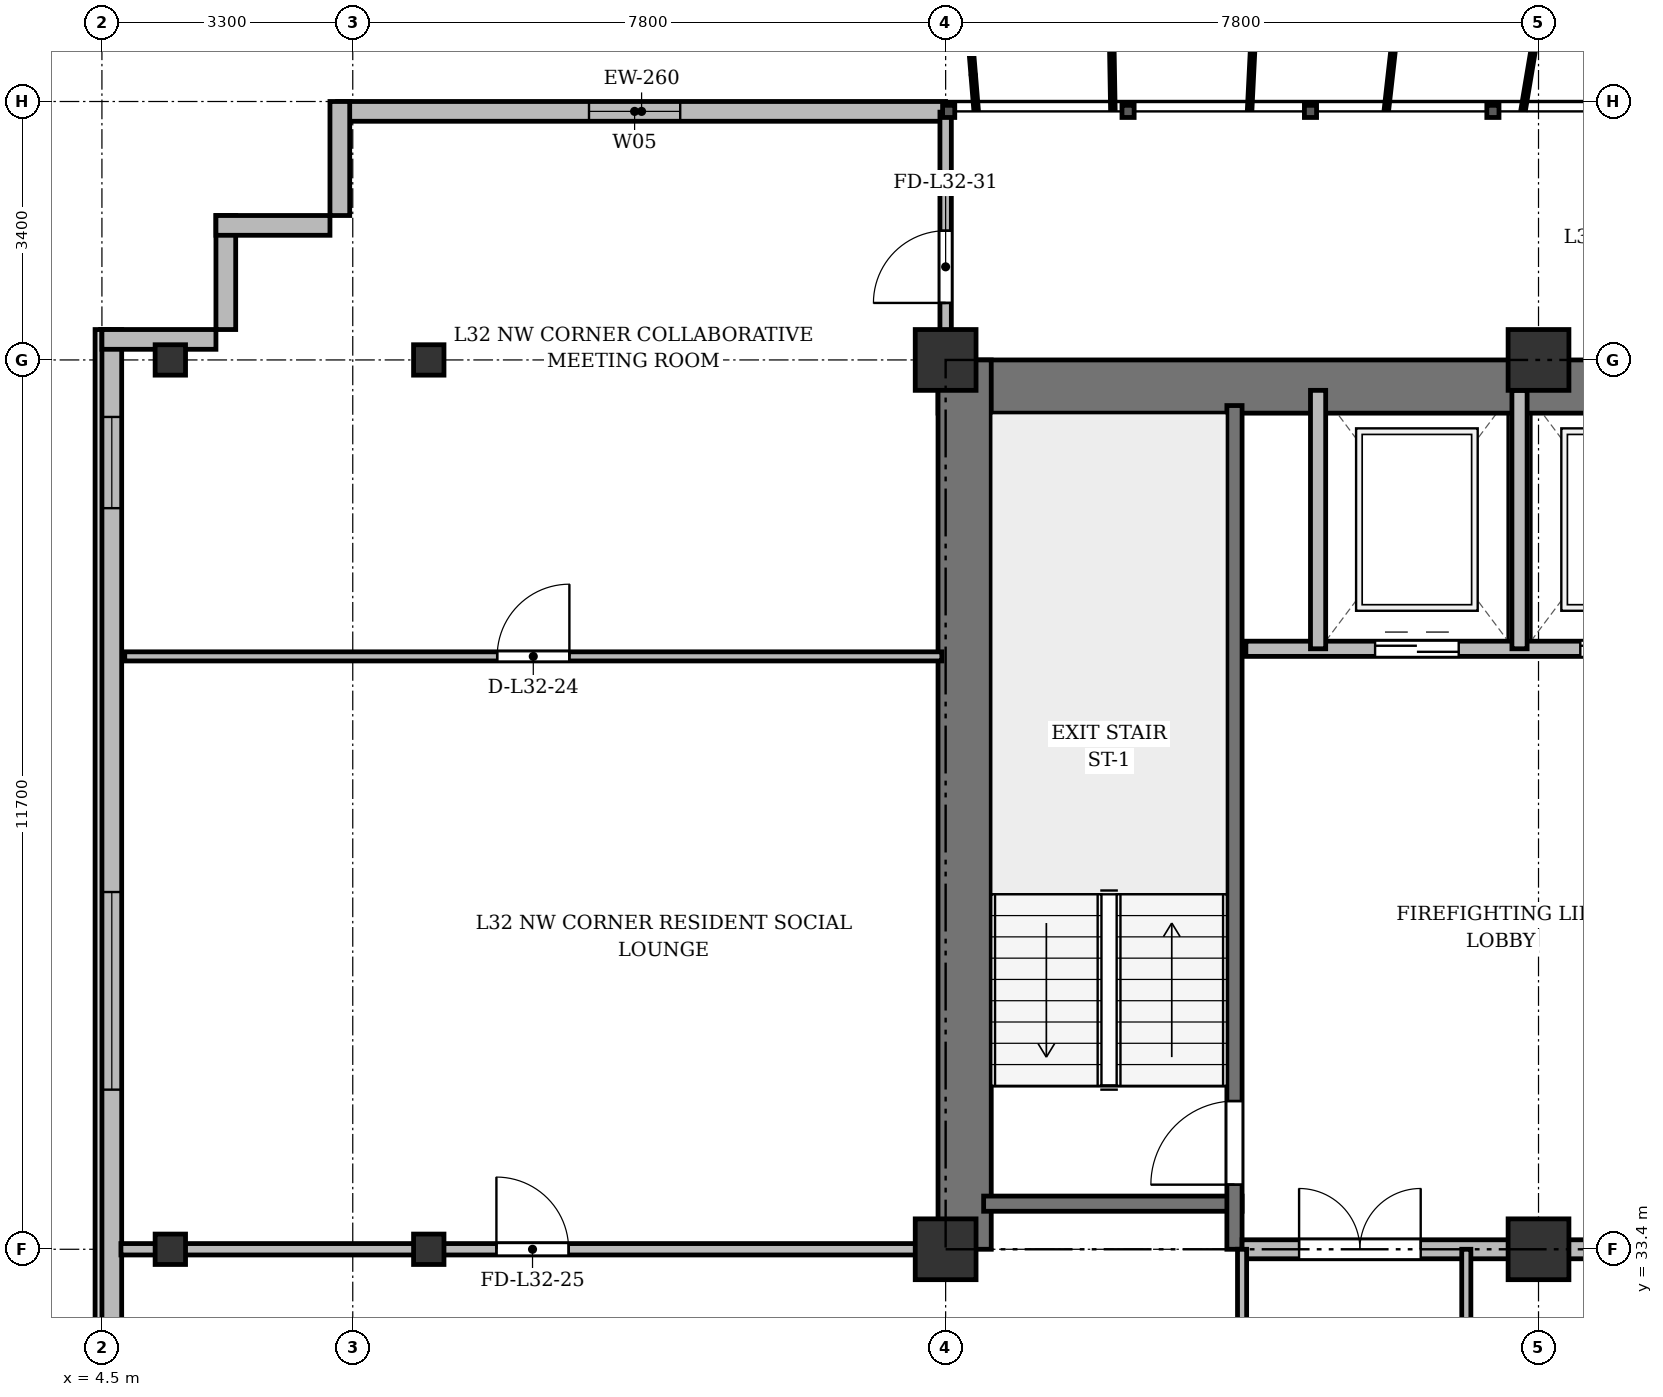
"""IFC4 building model, lengths in metres.
Left out: names, types, materials, properties, quantities, classifications, styles, units other than length and angle.
Written with IfcOpenShell. Run it as: python <this file> out.ifc"""

import sys

from ifc_helpers import new_model, si_unit, direction, frame, frame_2d, origin, origin_2d, place, context, subcontext, project, spatial, rectangle, i_section, extrude, source, transform, mapped, element, fill, save


model = new_model("IFC4")
c1 = context("Model", 3, precision=1e-05, world=origin(), true_north=direction((0.0, 1.0)))
c2 = subcontext(c1, "Body", "Model", "MODEL_VIEW")
j1 = project(units=[si_unit("LENGTHUNIT", "METRE"), si_unit("PLANEANGLEUNIT", "RADIAN")], contexts=[c1])
p1 = place(None, origin())
s1 = spatial("IfcSite", under=j1, at=p1, CompositionType="ELEMENT")
p2 = place(p1, origin())
s2 = spatial("IfcBuilding", under=s1, at=p2, CompositionType="ELEMENT")
p3 = place(p2, frame((0.0, 0.0, 124.9)))
s3 = spatial("IfcBuildingStorey", under=s2, at=p3, CompositionType="ELEMENT", Elevation=124.9)
m1 = source(origin(), c2, "Body", "SweptSolid", [
    extrude(i_section(OverallWidth=0.4, OverallDepth=0.4, WebThickness=0.022, FlangeThickness=0.035, at=origin_2d()), origin(), (0.0, 0.0, 1.0), 3.6),
])
for number, where, z_axis, x_axis in (
    (1, (5.4, 33.4, 0.0), (0.0, 0.0, 1.0), (1.0, 0.0, 0.0)),
    (2, (5.4, 45.1, 0.0), (0.0, 0.0, 1.0), (1.0, 0.0, 0.0)),
    (3, (8.8, 33.4, 0.0), (0.0, 0.0, 1.0), (1.0, 0.0, 0.0)),
    (4, (8.8, 45.1, 0.0), (0.0, 0.0, 1.0), (1.0, 0.0, 0.0)),
):
    element("IfcColumn", number, at=place(p3, frame(where, z_axis=z_axis, x_axis=x_axis)), inside=s3, PredefinedType="COLUMN", context=c2, shape_type="MappedRepresentation", body=[
        mapped(m1, transform((0.0, 0.0, 0.0), x_axis=(1.0, 0.0, 0.0), y_axis=(0.0, 1.0, 0.0), z_axis=(0.0, 0.0, 1.0), scale=1.0)),
    ])
m2 = source(origin(), c2, "Body", "SweptSolid", [
    extrude(rectangle(XDim=0.8, YDim=0.8, at=origin_2d()), origin(), (0.0, 0.0, 1.0), 3.6),
])
for number, where, z_axis, x_axis in (
    (5, (15.6, 33.4, 0.0), (0.0, 0.0, 1.0), (1.0, 0.0, 0.0)),
    (6, (15.6, 45.1, 0.0), (0.0, 0.0, 1.0), (1.0, 0.0, 0.0)),
    (7, (23.4, 33.4, 0.0), (0.0, 0.0, 1.0), (1.0, 0.0, 0.0)),
    (8, (23.4, 45.1, 0.0), (0.0, 0.0, 1.0), (1.0, 0.0, 0.0)),
):
    element("IfcColumn", number, at=place(p3, frame(where, z_axis=z_axis, x_axis=x_axis)), inside=s3, PredefinedType="COLUMN", context=c2, shape_type="MappedRepresentation", body=[
        mapped(m2, transform((0.0, 0.0, 0.0), x_axis=(1.0, 0.0, 0.0), y_axis=(0.0, 1.0, 0.0), z_axis=(0.0, 0.0, 1.0), scale=1.0)),
    ])
p4 = place(p3, frame((7.6, 48.37, 0.0), z_axis=(0.0, 0.0, 1.0), x_axis=(1.0, 0.0, 0.0)))
e9 = element("IfcWall", 9, at=p4, inside=s3, PredefinedType="SOLIDWALL", context=c2, shape_type="SweptSolid", body=[
    extrude(rectangle(XDim=8.0, YDim=0.26, at=frame_2d((4.0, 0.0))), origin(), (0.0, 0.0, 1.0), 3.34),
])
p5 = place(p4, frame((3.308, 0.0, 0.9)))
e10 = element("IfcOpeningElement", 10, at=p5, cuts=e9, PredefinedType="OPENING", context=c2, shape_type="SweptSolid", body=[
    extrude(rectangle(XDim=1.2, YDim=1.65, at=frame_2d((0.6, 0.825))), frame((0.0, 0.14, 0.0), z_axis=(0.0, -1.0, 0.0), x_axis=(1.0, 0.0, 0.0)), (0.0, 0.0, 1.0), 0.28),
])
p6 = place(p3, frame((4.63, 5.9, 0.0), z_axis=(0.0, 0.0, 1.0), x_axis=(0.0, 1.0, 0.0)))
e11 = element("IfcWall", 11, at=p6, inside=s3, PredefinedType="SOLIDWALL", context=c2, shape_type="SweptSolid", body=[
    extrude(rectangle(XDim=39.6, YDim=0.26, at=frame_2d((19.8, 0.0))), origin(), (0.0, 0.0, 1.0), 3.34),
])
p7 = place(p6, frame((1.45, 0.0, 0.92)))
e12 = element("IfcOpeningElement", 12, at=p7, cuts=e11, PredefinedType="OPENING", context=c2, shape_type="SweptSolid", body=[
    extrude(rectangle(XDim=1.2, YDim=1.65, at=frame_2d((0.6, 0.825))), frame((0.0, 0.14, 0.0), z_axis=(0.0, -1.0, 0.0), x_axis=(1.0, 0.0, 0.0)), (0.0, 0.0, 1.0), 0.28),
])
p8 = place(p6, frame((4.2, 0.0, 0.92)))
e13 = element("IfcOpeningElement", 13, at=p8, cuts=e11, PredefinedType="OPENING", context=c2, shape_type="SweptSolid", body=[
    extrude(rectangle(XDim=2.6, YDim=1.9, at=frame_2d((1.3, 0.95))), frame((0.0, 0.14, 0.0), z_axis=(0.0, -1.0, 0.0), x_axis=(1.0, 0.0, 0.0)), (0.0, 0.0, 1.0), 0.28),
])
p9 = place(p6, frame((8.4, 0.0, 0.92)))
e14 = element("IfcOpeningElement", 14, at=p9, cuts=e11, PredefinedType="OPENING", context=c2, shape_type="SweptSolid", body=[
    extrude(rectangle(XDim=2.6, YDim=1.9, at=frame_2d((1.3, 0.95))), frame((0.0, 0.14, 0.0), z_axis=(0.0, -1.0, 0.0), x_axis=(1.0, 0.0, 0.0)), (0.0, 0.0, 1.0), 0.28),
])
p10 = place(p6, frame((15.6, 0.0, 0.92)))
e15 = element("IfcOpeningElement", 15, at=p10, cuts=e11, PredefinedType="OPENING", context=c2, shape_type="SweptSolid", body=[
    extrude(rectangle(XDim=2.6, YDim=1.9, at=frame_2d((1.3, 0.95))), frame((0.0, 0.14, 0.0), z_axis=(0.0, -1.0, 0.0), x_axis=(1.0, 0.0, 0.0)), (0.0, 0.0, 1.0), 0.28),
])
p11 = place(p6, frame((29.6, 0.0, 0.92)))
e16 = element("IfcOpeningElement", 16, at=p11, cuts=e11, PredefinedType="OPENING", context=c2, shape_type="SweptSolid", body=[
    extrude(rectangle(XDim=2.6, YDim=1.9, at=frame_2d((1.3, 0.95))), frame((0.0, 0.14, 0.0), z_axis=(0.0, -1.0, 0.0), x_axis=(1.0, 0.0, 0.0)), (0.0, 0.0, 1.0), 0.28),
])
p12 = place(p6, frame((37.25, 0.0, 0.92)))
e17 = element("IfcOpeningElement", 17, at=p12, cuts=e11, PredefinedType="OPENING", context=c2, shape_type="SweptSolid", body=[
    extrude(rectangle(XDim=1.2, YDim=1.65, at=frame_2d((0.6, 0.825))), frame((0.0, 0.14, 0.0), z_axis=(0.0, -1.0, 0.0), x_axis=(1.0, 0.0, 0.0)), (0.0, 0.0, 1.0), 0.28),
])
p13 = place(p3, frame((4.5, 45.37, 0.0), z_axis=(0.0, 0.0, 1.0), x_axis=(1.0, 0.0, 0.0)))
e18 = element("IfcWall", 18, at=p13, inside=s3, PredefinedType="SOLIDWALL", context=c2, shape_type="SweptSolid", body=[
    extrude(rectangle(XDim=1.5, YDim=0.26, at=frame_2d((0.75, 0.0))), origin(), (0.0, 0.0, 1.0), 2.752),
])
for number, where, z_axis, x_axis in (
    (19, (6.13, 45.5, 0.0), (0.0, 0.0, 1.0), (0.0, 1.0, 0.0)),
    (20, (6.0, 46.87, 0.0), (0.0, 0.0, 1.0), (1.0, 0.0, 0.0)),
    (21, (7.63, 47.0, 0.0), (0.0, 0.0, 1.0), (0.0, 1.0, 0.0)),
):
    element("IfcWall", number, at=place(p3, frame(where, z_axis=z_axis, x_axis=x_axis)), inside=s3, PredefinedType="SOLIDWALL", context=c2, shape_type="SweptSolid", body=[
        extrude(rectangle(XDim=1.5, YDim=0.26, at=frame_2d((0.75, 0.0))), origin(), (0.0, 0.0, 1.0), 3.34),
    ])
p14 = place(p3, frame((15.5, 44.75, 0.0), z_axis=(0.0, 0.0, 1.0), x_axis=(1.0, 0.0, 0.0)))
e22 = element("IfcWall", 22, at=p14, inside=s3, PredefinedType="SHEAR", context=c2, shape_type="SweptSolid", body=[
    extrude(rectangle(XDim=43.4, YDim=0.7, at=frame_2d((21.7, 0.0))), origin(), (0.0, 0.0, 1.0), 3.34),
])
p15 = place(p3, frame((15.85, 33.4, 0.0), z_axis=(0.0, 0.0, 1.0), x_axis=(0.0, 1.0, 0.0)))
e23 = element("IfcWall", 23, at=p15, inside=s3, PredefinedType="SHEAR", context=c2, shape_type="SweptSolid", body=[
    extrude(rectangle(XDim=11.7, YDim=0.7, at=frame_2d((5.85, 0.0))), origin(), (0.0, 0.0, 1.0), 3.34),
])
p16 = place(p3, frame((16.1, 34.0, 0.0), z_axis=(0.0, 0.0, 1.0), x_axis=(1.0, 0.0, 0.0)))
e24 = element("IfcWall", 24, at=p16, inside=s3, PredefinedType="SHEAR", context=c2, shape_type="SweptSolid", body=[
    extrude(rectangle(XDim=3.4, YDim=0.2, at=frame_2d((1.7, 0.0))), origin(), (0.0, 0.0, 1.0), 3.34),
])
p17 = place(p3, frame((19.4, 33.4, 0.0), z_axis=(0.0, 0.0, 1.0), x_axis=(0.0, 1.0, 0.0)))
e25 = element("IfcWall", 25, at=p17, inside=s3, PredefinedType="SHEAR", context=c2, shape_type="SweptSolid", body=[
    extrude(rectangle(XDim=11.1, YDim=0.2, at=frame_2d((5.55, 0.0))), origin(), (0.0, 0.0, 1.0), 3.34),
])
p18 = place(p17, frame((0.85, 0.0, 0.0)))
e26 = element("IfcOpeningElement", 26, at=p18, cuts=e25, PredefinedType="OPENING", context=c2, shape_type="SweptSolid", body=[
    extrude(rectangle(XDim=1.1, YDim=2.15, at=frame_2d((0.55, 1.075))), frame((0.0, 0.11, 0.0), z_axis=(0.0, -1.0, 0.0), x_axis=(1.0, 0.0, 0.0)), (0.0, 0.0, 1.0), 0.22),
])
p19 = place(p3, frame((19.55, 41.3, 0.0), z_axis=(0.0, 0.0, 1.0), x_axis=(1.0, 0.0, 0.0)))
e27 = element("IfcWall", 27, at=p19, inside=s3, PredefinedType="SOLIDWALL", context=c2, shape_type="SweptSolid", body=[
    extrude(rectangle(XDim=6.75, YDim=0.2, at=frame_2d((3.375, 0.0))), origin(), (0.0, 0.0, 1.0), 3.34),
])
p20 = place(p19, frame((1.7, 0.0, 0.0)))
e28 = element("IfcOpeningElement", 28, at=p20, cuts=e27, PredefinedType="OPENING", context=c2, shape_type="SweptSolid", body=[
    extrude(rectangle(XDim=1.1, YDim=2.15, at=frame_2d((0.55, 1.075))), frame((0.0, 0.11, 0.0), z_axis=(0.0, -1.0, 0.0), x_axis=(1.0, 0.0, 0.0)), (0.0, 0.0, 1.0), 0.22),
])
p21 = place(p19, frame((4.4, 0.0, 0.0)))
e29 = element("IfcOpeningElement", 29, at=p21, cuts=e27, PredefinedType="OPENING", context=c2, shape_type="SweptSolid", body=[
    extrude(rectangle(XDim=1.1, YDim=2.15, at=frame_2d((0.55, 1.075))), frame((0.0, 0.11, 0.0), z_axis=(0.0, -1.0, 0.0), x_axis=(1.0, 0.0, 0.0)), (0.0, 0.0, 1.0), 0.22),
])
for number, where, z_axis, x_axis in (
    (30, (20.5, 41.3, 0.0), (0.0, 0.0, 1.0), (0.0, 1.0, 0.0)),
    (31, (23.15, 41.3, 0.0), (0.0, 0.0, 1.0), (0.0, 1.0, 0.0)),
):
    element("IfcWall", number, at=place(p3, frame(where, z_axis=z_axis, x_axis=x_axis)), inside=s3, PredefinedType="SOLIDWALL", context=c2, shape_type="SweptSolid", body=[
        extrude(rectangle(XDim=3.4, YDim=0.2, at=frame_2d((1.7, 0.0))), origin(), (0.0, 0.0, 1.0), 3.34),
    ])
p22 = place(p3, frame((19.5, 33.4, 0.0), z_axis=(0.0, 0.0, 1.0), x_axis=(1.0, 0.0, 0.0)))
e32 = element("IfcWall", 32, at=p22, inside=s3, PredefinedType="PARTITIONING", context=c2, shape_type="SweptSolid", body=[
    extrude(rectangle(XDim=6.8, YDim=0.25, at=frame_2d((3.4, 0.0))), origin(), (0.0, 0.0, 1.0), 2.752),
])
p23 = place(p22, frame((0.75, 0.0, 0.0)))
e33 = element("IfcOpeningElement", 33, at=p23, cuts=e32, PredefinedType="OPENING", context=c2, shape_type="SweptSolid", body=[
    extrude(rectangle(XDim=1.6, YDim=2.2, at=frame_2d((0.8, 1.1))), frame((0.0, 0.135, 0.0), z_axis=(0.0, -1.0, 0.0), x_axis=(1.0, 0.0, 0.0)), (0.0, 0.0, 1.0), 0.27),
])
for number, where, z_axis, x_axis in (
    (34, (19.5, 29.8, 0.0), (0.0, 0.0, 1.0), (0.0, 1.0, 0.0)),
    (35, (22.45, 29.8, 0.0), (0.0, 0.0, 1.0), (0.0, 1.0, 0.0)),
):
    element("IfcWall", number, at=place(p3, frame(where, z_axis=z_axis, x_axis=x_axis)), inside=s3, PredefinedType="PARTITIONING", context=c2, shape_type="SweptSolid", body=[
        extrude(rectangle(XDim=3.6, YDim=0.12, at=frame_2d((1.8, 0.0))), origin(), (0.0, 0.0, 1.0), 2.752),
    ])
p24 = place(p3, frame((4.8, 41.2, 0.0), z_axis=(0.0, 0.0, 1.0), x_axis=(1.0, 0.0, 0.0)))
e36 = element("IfcWall", 36, at=p24, inside=s3, PredefinedType="PARTITIONING", context=c2, shape_type="SweptSolid", body=[
    extrude(rectangle(XDim=10.75, YDim=0.12, at=frame_2d((5.375, 0.0))), origin(), (0.0, 0.0, 1.0), 2.84),
])
p25 = place(p24, frame((4.9, 0.0, 0.0)))
e37 = element("IfcOpeningElement", 37, at=p25, cuts=e36, PredefinedType="OPENING", context=c2, shape_type="SweptSolid", body=[
    extrude(rectangle(XDim=0.95, YDim=2.15, at=frame_2d((0.475, 1.075))), frame((0.0, 0.07, 0.0), z_axis=(0.0, -1.0, 0.0), x_axis=(1.0, 0.0, 0.0)), (0.0, 0.0, 1.0), 0.14),
])
p26 = place(p3, frame((4.75, 33.4, 0.0), z_axis=(0.0, 0.0, 1.0), x_axis=(1.0, 0.0, 0.0)))
e38 = element("IfcWall", 38, at=p26, inside=s3, PredefinedType="PARTITIONING", context=c2, shape_type="SweptSolid", body=[
    extrude(rectangle(XDim=10.85, YDim=0.15, at=frame_2d((5.425, 0.0))), origin(), (0.0, 0.0, 1.0), 2.752),
])
p27 = place(p26, frame((4.94, 0.0, 0.0)))
e39 = element("IfcOpeningElement", 39, at=p27, cuts=e38, PredefinedType="OPENING", context=c2, shape_type="SweptSolid", body=[
    extrude(rectangle(XDim=0.95, YDim=2.15, at=frame_2d((0.475, 1.075))), frame((0.0, 0.085, 0.0), z_axis=(0.0, -1.0, 0.0), x_axis=(1.0, 0.0, 0.0)), (0.0, 0.0, 1.0), 0.17),
])
p28 = place(p3, frame((15.6, 44.75, 0.0), z_axis=(0.0, 0.0, 1.0), x_axis=(0.0, 1.0, 0.0)))
e40 = element("IfcWall", 40, at=p28, inside=s3, PredefinedType="PARTITIONING", context=c2, shape_type="SweptSolid", body=[
    extrude(rectangle(XDim=3.61, YDim=0.15, at=frame_2d((1.805, 0.0))), origin(), (0.0, 0.0, 1.0), 2.84),
])
p29 = place(p28, frame((1.1, 0.0, 0.0)))
e41 = element("IfcOpeningElement", 41, at=p29, cuts=e40, PredefinedType="OPENING", context=c2, shape_type="SweptSolid", body=[
    extrude(rectangle(XDim=0.95, YDim=2.15, at=frame_2d((0.475, 1.075))), frame((0.0, 0.085, 0.0), z_axis=(0.0, -1.0, 0.0), x_axis=(1.0, 0.0, 0.0)), (0.0, 0.0, 1.0), 0.17),
])
m3 = source(origin(), c2, "Body", "SweptSolid", [
    extrude(rectangle(XDim=1.2, YDim=1.65, at=frame_2d((0.6, 0.825))), frame((0.0, 0.03, 0.0), z_axis=(0.0, -1.0, 0.0), x_axis=(1.0, 0.0, 0.0)), (0.0, 0.0, 1.0), 0.06),
])
p30 = place(p5, origin())
e42 = element("IfcWindow", 42, at=p30, inside=s3, PartitioningType="SINGLE_PANEL", PredefinedType="WINDOW", context=c2, shape_type="MappedRepresentation", body=[
    mapped(m3, transform((0.0, 0.0, 0.0), x_axis=(1.0, 0.0, 0.0), y_axis=(0.0, 1.0, 0.0), z_axis=(0.0, 0.0, 1.0), scale=1.0)),
])
fill(e10, e42)
m4 = source(origin(), c2, "Body", "SweptSolid", [
    extrude(rectangle(XDim=2.6, YDim=1.9, at=frame_2d((1.3, 0.95))), frame((0.0, 0.03, 0.0), z_axis=(0.0, -1.0, 0.0), x_axis=(1.0, 0.0, 0.0)), (0.0, 0.0, 1.0), 0.06),
])
p31 = place(p11, origin())
e43 = element("IfcWindow", 43, at=p31, inside=s3, PartitioningType="SINGLE_PANEL", PredefinedType="WINDOW", context=c2, shape_type="MappedRepresentation", body=[
    mapped(m4, transform((0.0, 0.0, 0.0), x_axis=(1.0, 0.0, 0.0), y_axis=(0.0, 1.0, 0.0), z_axis=(0.0, 0.0, 1.0), scale=1.0)),
])
fill(e16, e43)
p32 = place(p12, origin())
e44 = element("IfcWindow", 44, at=p32, inside=s3, PartitioningType="SINGLE_PANEL", PredefinedType="WINDOW", context=c2, shape_type="MappedRepresentation", body=[
    mapped(m3, transform((0.0, 0.0, 0.0), x_axis=(1.0, 0.0, 0.0), y_axis=(0.0, 1.0, 0.0), z_axis=(0.0, 0.0, 1.0), scale=1.0)),
])
fill(e17, e44)
m5 = source(origin(), c2, "Body", "SweptSolid", [
    extrude(rectangle(XDim=1.1, YDim=2.15, at=frame_2d((0.55, 1.075))), frame((0.0, 0.025, 0.0), z_axis=(0.0, -1.0, 0.0), x_axis=(1.0, 0.0, 0.0)), (0.0, 0.0, 1.0), 0.05),
])
p33 = place(p18, origin())
e45 = element("IfcDoor", 45, at=p33, inside=s3, OperationType="SINGLE_SWING_LEFT", PredefinedType="DOOR", context=c2, shape_type="MappedRepresentation", body=[
    mapped(m5, transform((0.0, 0.0, 0.0), x_axis=(1.0, 0.0, 0.0), y_axis=(0.0, 1.0, 0.0), z_axis=(0.0, 0.0, 1.0), scale=1.0)),
])
fill(e26, e45)
p34 = place(p20, origin())
e46 = element("IfcDoor", 46, at=p34, inside=s3, OperationType="DOUBLE_DOOR_SLIDING", PredefinedType="DOOR", context=c2, shape_type="MappedRepresentation", body=[
    mapped(m5, transform((0.0, 0.0, 0.0), x_axis=(1.0, 0.0, 0.0), y_axis=(0.0, 1.0, 0.0), z_axis=(0.0, 0.0, 1.0), scale=1.0)),
])
fill(e28, e46)
p35 = place(p21, origin())
e47 = element("IfcDoor", 47, at=p35, inside=s3, OperationType="DOUBLE_DOOR_SLIDING", PredefinedType="DOOR", context=c2, shape_type="MappedRepresentation", body=[
    mapped(m5, transform((0.0, 0.0, 0.0), x_axis=(1.0, 0.0, 0.0), y_axis=(0.0, 1.0, 0.0), z_axis=(0.0, 0.0, 1.0), scale=1.0)),
])
fill(e29, e47)
m6 = source(origin(), c2, "Body", "SweptSolid", [
    extrude(rectangle(XDim=1.6, YDim=2.2, at=frame_2d((0.8, 1.1))), frame((0.0, 0.025, 0.0), z_axis=(0.0, -1.0, 0.0), x_axis=(1.0, 0.0, 0.0)), (0.0, 0.0, 1.0), 0.05),
])
p36 = place(p23, origin())
e48 = element("IfcDoor", 48, at=p36, inside=s3, OperationType="DOUBLE_DOOR_SINGLE_SWING", PredefinedType="DOOR", context=c2, shape_type="MappedRepresentation", body=[
    mapped(m6, transform((0.0, 0.0, 0.0), x_axis=(1.0, 0.0, 0.0), y_axis=(0.0, 1.0, 0.0), z_axis=(0.0, 0.0, 1.0), scale=1.0)),
])
fill(e33, e48)
m7 = source(origin(), c2, "Body", "SweptSolid", [
    extrude(rectangle(XDim=0.95, YDim=2.15, at=frame_2d((0.475, 1.075))), frame((0.0, 0.025, 0.0), z_axis=(0.0, -1.0, 0.0), x_axis=(1.0, 0.0, 0.0)), (0.0, 0.0, 1.0), 0.05),
])
p37 = place(p25, origin())
e49 = element("IfcDoor", 49, at=p37, inside=s3, OperationType="SINGLE_SWING_RIGHT", PredefinedType="DOOR", context=c2, shape_type="MappedRepresentation", body=[
    mapped(m7, transform((0.0, 0.0, 0.0), x_axis=(1.0, 0.0, 0.0), y_axis=(0.0, 1.0, 0.0), z_axis=(0.0, 0.0, 1.0), scale=1.0)),
])
fill(e37, e49)
p38 = place(p27, origin())
e50 = element("IfcDoor", 50, at=p38, inside=s3, OperationType="SINGLE_SWING_LEFT", PredefinedType="DOOR", context=c2, shape_type="MappedRepresentation", body=[
    mapped(m7, transform((0.0, 0.0, 0.0), x_axis=(1.0, 0.0, 0.0), y_axis=(0.0, 1.0, 0.0), z_axis=(0.0, 0.0, 1.0), scale=1.0)),
])
fill(e39, e50)
p39 = place(p29, origin())
e51 = element("IfcDoor", 51, at=p39, inside=s3, OperationType="SINGLE_SWING_LEFT", PredefinedType="DOOR", context=c2, shape_type="MappedRepresentation", body=[
    mapped(m7, transform((0.0, 0.0, 0.0), x_axis=(1.0, 0.0, 0.0), y_axis=(0.0, 1.0, 0.0), z_axis=(0.0, 0.0, 1.0), scale=1.0)),
])
fill(e41, e51)
save(model, sys.argv[1])
